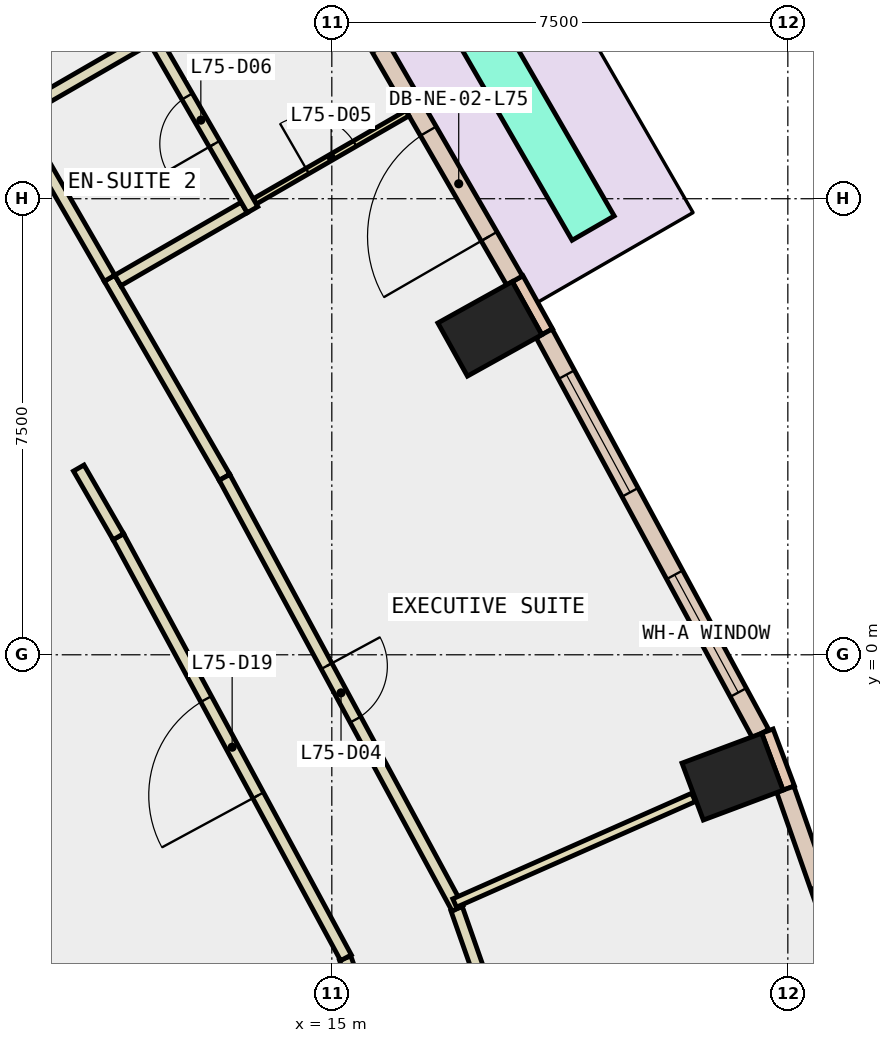
"""IFC4 building model, lengths in metres.
Left out: names, types, materials, properties, quantities, classifications, styles, units other than length and angle.
Written with IfcOpenShell. Run it as: python <this file> out.ifc"""

import sys

from ifc_helpers import new_model, si_unit, direction, frame, frame_2d, origin, origin_2d, place, context, subcontext, project, spatial, rectangle, extrude, element, fill, save


model = new_model("IFC4")
c1 = context("Model", 3, precision=1e-05, world=origin(), true_north=direction((0.0, 1.0)))
c2 = subcontext(c1, "Body", "Model", "MODEL_VIEW")
j1 = project(units=[si_unit("LENGTHUNIT", "METRE"), si_unit("PLANEANGLEUNIT", "RADIAN")], contexts=[c1])
p1 = place(None, origin())
s1 = spatial("IfcSite", under=j1, at=p1, CompositionType="ELEMENT")
p2 = place(p1, origin())
s2 = spatial("IfcBuilding", under=s1, at=p2, CompositionType="ELEMENT")
p3 = place(p2, frame((0.0, 0.0, 318.8)))
s3 = spatial("IfcBuildingStorey", under=s2, at=p3, CompositionType="ELEMENT", Elevation=318.8)
for number, where, z_axis, x_axis in (
    (1, (21.59, -2.004, -0.34), (0.0, 0.0, 1.0), (-0.351, 0.936, 0.0)),
    (2, (17.599, 5.36, -0.34), (0.0, 0.0, 1.0), (-0.486, 0.874, 0.0)),
):
    element("IfcColumn", number, at=place(p3, frame(where, z_axis=z_axis, x_axis=x_axis)), inside=s3, PredefinedType="COLUMN", context=c2, shape_type="SweptSolid", body=[
        extrude(rectangle(XDim=1.0, YDim=1.4, at=origin_2d()), origin(), (0.0, 0.0, 1.0), 3.6),
    ])
p4 = place(p3, frame((6.279, -3.625, -0.34), z_axis=(0.0, 0.0, 1.0), x_axis=(0.866017533419, -0.500013631625, 0.0)))
e3 = element("IfcWall", 3, at=p4, inside=s3, PredefinedType="SHEAR", context=c2, shape_type="SweptSolid", body=[
    extrude(rectangle(XDim=9.0, YDim=0.8, at=frame_2d((4.5, 0.0))), origin(), (0.0, 0.0, 1.0), 3.6),
])
p5 = place(p3, frame((22.515, -2.191, 0.0), z_axis=(0.0, 0.0, 1.0), x_axis=(-0.350962844851, 0.936389385637, 0.0)))
e4 = element("IfcWall", 4, at=p5, inside=s3, PredefinedType="STANDARD", context=c2, shape_type="SweptSolid", body=[
    extrude(rectangle(XDim=1.0, YDim=0.2, at=frame_2d((0.5, 0.0))), origin(), (0.0, 0.0, 1.0), 3.26),
])
p6 = place(p3, frame((18.542, 5.311, 0.0), z_axis=(0.0, 0.0, 1.0), x_axis=(-0.486036693078, 0.873938403425, 0.0)))
e5 = element("IfcWall", 5, at=p6, inside=s3, PredefinedType="STANDARD", context=c2, shape_type="SweptSolid", body=[
    extrude(rectangle(XDim=1.0, YDim=0.2, at=frame_2d((0.5, 0.0))), origin(), (0.0, 0.0, 1.0), 3.26),
])
p7 = place(p3, frame((24.029, -6.692, 0.0), z_axis=(0.0, 0.0, 1.0), x_axis=(-0.330923030855, 0.943657749213, 0.0)))
e6 = element("IfcWall", 6, at=p7, inside=s3, PredefinedType="STANDARD", context=c2, shape_type="SweptSolid", body=[
    extrude(rectangle(XDim=4.748, YDim=0.3, at=frame_2d((2.374, 0.0))), origin(), (0.0, 0.0, 1.0), 3.26),
])
p8 = place(p7, frame((1.674, 0.0, 0.9)))
e7 = element("IfcOpeningElement", 7, at=p8, cuts=e6, PredefinedType="OPENING", context=c2, shape_type="SweptSolid", body=[
    extrude(rectangle(XDim=1.4, YDim=2.0, at=frame_2d((0.7, 1.0))), frame((0.0, 0.16, 0.0), z_axis=(0.0, -1.0, 0.0), x_axis=(1.0, 0.0, 0.0)), (0.0, 0.0, 1.0), 0.32),
])
p9 = place(p3, frame((22.052, -1.298, 0.0), z_axis=(0.0, 0.0, 1.0), x_axis=(-0.475690331633, 0.879612817319, 0.0)))
e8 = element("IfcWall", 8, at=p9, inside=s3, PredefinedType="STANDARD", context=c2, shape_type="SweptSolid", body=[
    extrude(rectangle(XDim=7.484, YDim=0.3, at=frame_2d((3.742, 0.0))), origin(), (0.0, 0.0, 1.0), 3.26),
])
p10 = place(p9, frame((0.771, 0.0, 0.9)))
e9 = element("IfcOpeningElement", 9, at=p10, cuts=e8, PredefinedType="OPENING", context=c2, shape_type="SweptSolid", body=[
    extrude(rectangle(XDim=2.2, YDim=2.0, at=frame_2d((1.1, 1.0))), frame((0.0, 0.16, 0.0), z_axis=(0.0, -1.0, 0.0), x_axis=(1.0, 0.0, 0.0)), (0.0, 0.0, 1.0), 0.32),
])
p11 = place(p9, frame((4.513, 0.0, 0.9)))
e10 = element("IfcOpeningElement", 10, at=p11, cuts=e8, PredefinedType="OPENING", context=c2, shape_type="SweptSolid", body=[
    extrude(rectangle(XDim=2.2, YDim=2.0, at=frame_2d((1.1, 1.0))), frame((0.0, 0.16, 0.0), z_axis=(0.0, -1.0, 0.0), x_axis=(1.0, 0.0, 0.0)), (0.0, 0.0, 1.0), 0.32),
])
p12 = place(p3, frame((18.005, 6.156, 0.0), z_axis=(0.0, 0.0, 1.0), x_axis=(-0.499958474759, 0.866049377066, 0.0)))
e11 = element("IfcWall", 11, at=p12, inside=s3, PredefinedType="STANDARD", context=c2, shape_type="SweptSolid", body=[
    extrude(rectangle(XDim=7.342, YDim=0.3, at=frame_2d((3.671, 0.0))), origin(), (0.0, 0.0, 1.0), 3.26),
])
p13 = place(p12, frame((0.836, 0.0, 0.0)))
e12 = element("IfcOpeningElement", 12, at=p13, cuts=e11, PredefinedType="OPENING", context=c2, shape_type="SweptSolid", body=[
    extrude(rectangle(XDim=2.0, YDim=2.4, at=frame_2d((1.0, 1.2))), frame((0.0, 0.16, 0.0), z_axis=(0.0, -1.0, 0.0), x_axis=(1.0, 0.0, 0.0)), (0.0, 0.0, 1.0), 0.32),
])
p14 = place(p12, frame((4.407, 0.0, 0.9)))
e13 = element("IfcOpeningElement", 13, at=p14, cuts=e11, PredefinedType="OPENING", context=c2, shape_type="SweptSolid", body=[
    extrude(rectangle(XDim=2.2, YDim=2.0, at=frame_2d((1.1, 1.0))), frame((0.0, 0.16, 0.0), z_axis=(0.0, -1.0, 0.0), x_axis=(1.0, 0.0, 0.0)), (0.0, 0.0, 1.0), 0.32),
])
p15 = place(p3, frame((19.298, 7.017, 0.0), z_axis=(0.0, 0.0, 1.0), x_axis=(-0.50009711543, 0.865969326904, 0.0)))
e14 = element("IfcWall", 14, at=p15, inside=s3, PredefinedType="STANDARD", context=c2, shape_type="SweptSolid", body=[
    extrude(rectangle(XDim=7.145, YDim=0.8, at=frame_2d((3.572, 0.0))), origin(), (0.0, 0.0, 1.0), 0.8),
])
p16 = place(p3, frame((16.194, -7.768, 0.0), z_axis=(0.0, 0.0, 1.0), x_axis=(-0.330981563235, 0.943637220969, 0.0)))
e15 = element("IfcWall", 15, at=p16, inside=s3, PredefinedType="PARTITIONING", context=c2, shape_type="SweptSolid", body=[
    extrude(rectangle(XDim=2.946, YDim=0.2, at=frame_2d((1.473, 0.0))), origin(), (0.0, 0.0, 1.0), 3.26),
])
p17 = place(p3, frame((15.233, -4.982, 0.0), z_axis=(0.0, 0.0, 1.0), x_axis=(-0.475643534049, 0.879638123615, 0.0)))
e16 = element("IfcWall", 16, at=p17, inside=s3, PredefinedType="PARTITIONING", context=c2, shape_type="SweptSolid", body=[
    extrude(rectangle(XDim=7.871, YDim=0.2, at=frame_2d((3.936, 0.0))), origin(), (0.0, 0.0, 1.0), 3.26),
])
p18 = place(p17, frame((3.036, 0.0, 0.0)))
e17 = element("IfcOpeningElement", 17, at=p18, cuts=e16, PredefinedType="OPENING", context=c2, shape_type="SweptSolid", body=[
    extrude(rectangle(XDim=1.8, YDim=2.1, at=frame_2d((0.9, 1.05))), frame((0.0, 0.11, 0.0), z_axis=(0.0, -1.0, 0.0), x_axis=(1.0, 0.0, 0.0)), (0.0, 0.0, 1.0), 0.22),
])
p19 = place(p3, frame((11.489, 1.942, 0.0), z_axis=(0.0, 0.0, 1.0), x_axis=(-0.499544076393, 0.866288471435, 0.0)))
e18 = element("IfcWall", 18, at=p19, inside=s3, PredefinedType="PARTITIONING", context=c2, shape_type="SweptSolid", body=[
    extrude(rectangle(XDim=1.303, YDim=0.2, at=frame_2d((0.652, 0.0))), origin(), (0.0, 0.0, 1.0), 3.26),
])
p20 = place(p3, frame((17.053, -4.177, 0.0), z_axis=(0.0, 0.0, 1.0), x_axis=(0.33112192567, -0.943587977001, 0.0)))
e19 = element("IfcWall", 19, at=p20, inside=s3, PredefinedType="PARTITIONING", context=c2, shape_type="SweptSolid", body=[
    extrude(rectangle(XDim=3.678, YDim=0.2, at=frame_2d((1.839, 0.0))), origin(), (0.0, 0.0, 1.0), 3.26),
])
p21 = place(p3, frame((11.344, 6.193, 0.0), z_axis=(0.0, 0.0, 1.0), x_axis=(0.50004096614, -0.86600175068, 0.0)))
e20 = element("IfcWall", 20, at=p21, inside=s3, PredefinedType="PARTITIONING", context=c2, shape_type="SweptSolid", body=[
    extrude(rectangle(XDim=3.782, YDim=0.2, at=frame_2d((1.891, 0.0))), origin(), (0.0, 0.0, 1.0), 3.26),
])
p22 = place(p3, frame((13.235, 2.918, 0.0), z_axis=(0.0, 0.0, 1.0), x_axis=(0.475681790703, -0.879617436158, 0.0)))
e21 = element("IfcWall", 21, at=p22, inside=s3, PredefinedType="PARTITIONING", context=c2, shape_type="SweptSolid", body=[
    extrude(rectangle(XDim=8.058, YDim=0.2, at=frame_2d((4.029, 0.0))), origin(), (0.0, 0.0, 1.0), 3.26),
])
p23 = place(p22, frame((3.529, 0.0, 0.0)))
e22 = element("IfcOpeningElement", 22, at=p23, cuts=e21, PredefinedType="OPENING", context=c2, shape_type="SweptSolid", body=[
    extrude(rectangle(XDim=1.0, YDim=2.1, at=frame_2d((0.5, 1.05))), frame((0.0, 0.11, 0.0), z_axis=(0.0, -1.0, 0.0), x_axis=(1.0, 0.0, 0.0)), (0.0, 0.0, 1.0), 0.22),
])
p24 = place(p3, frame((9.744, 8.964, 0.0), z_axis=(0.0, 0.0, 1.0), x_axis=(0.500290307618, -0.865857729713, 0.0)))
e23 = element("IfcWall", 23, at=p24, inside=s3, PredefinedType="PARTITIONING", context=c2, shape_type="SweptSolid", body=[
    extrude(rectangle(XDim=3.2, YDim=0.2, at=frame_2d((1.6, 0.0))), origin(), (0.0, 0.0, 1.0), 3.26),
])
p25 = place(p3, frame((17.02, -4.082, 0.0), z_axis=(0.0, 0.0, 1.0), x_axis=(0.914599611743, 0.404360668462, 0.0)))
e24 = element("IfcWall", 24, at=p25, inside=s3, PredefinedType="PARTITIONING", context=c2, shape_type="SweptSolid", body=[
    extrude(rectangle(XDim=4.296, YDim=0.15, at=frame_2d((2.148, 0.0))), origin(), (0.0, 0.0, 1.0), 3.26),
])
p26 = place(p3, frame((13.733, 7.456, 0.0), z_axis=(0.0, 0.0, 1.0), x_axis=(0.865990674793, 0.500060147554, 0.0)))
e25 = element("IfcWall", 25, at=p26, inside=s3, PredefinedType="PARTITIONING", context=c2, shape_type="SweptSolid", body=[
    extrude(rectangle(XDim=2.9, YDim=0.1, at=frame_2d((1.45, 0.0))), origin(), (0.0, 0.0, 1.0), 3.26),
])
p27 = place(p26, frame((1.0, 0.0, 0.0)))
e26 = element("IfcOpeningElement", 26, at=p27, cuts=e25, PredefinedType="OPENING", context=c2, shape_type="SweptSolid", body=[
    extrude(rectangle(XDim=0.9, YDim=2.1, at=frame_2d((0.45, 1.05))), frame((0.0, 0.06, 0.0), z_axis=(0.0, -1.0, 0.0), x_axis=(1.0, 0.0, 0.0)), (0.0, 0.0, 1.0), 0.12),
])
p28 = place(p3, frame((11.481, 6.156, 0.0), z_axis=(0.0, 0.0, 1.0), x_axis=(0.865999212041, 0.500045362686, 0.0)))
e27 = element("IfcWall", 27, at=p28, inside=s3, PredefinedType="PARTITIONING", context=c2, shape_type="SweptSolid", body=[
    extrude(rectangle(XDim=2.4, YDim=0.2, at=frame_2d((1.2, 0.0))), origin(), (0.0, 0.0, 1.0), 3.26),
])
p29 = place(p3, frame((13.696, 7.32, 0.0), z_axis=(0.0, 0.0, 1.0), x_axis=(-0.500070584245, 0.865984648116, 0.0)))
e28 = element("IfcWall", 28, at=p29, inside=s3, PredefinedType="PARTITIONING", context=c2, shape_type="SweptSolid", body=[
    extrude(rectangle(XDim=3.399, YDim=0.2, at=frame_2d((1.7, 0.0))), origin(), (0.0, 0.0, 1.0), 3.26),
])
p30 = place(p29, frame((1.25, 0.0, 0.0)))
e29 = element("IfcOpeningElement", 29, at=p30, cuts=e28, PredefinedType="OPENING", context=c2, shape_type="SweptSolid", body=[
    extrude(rectangle(XDim=0.9, YDim=2.1, at=frame_2d((0.45, 1.05))), frame((0.0, 0.11, 0.0), z_axis=(0.0, -1.0, 0.0), x_axis=(1.0, 0.0, 0.0)), (0.0, 0.0, 1.0), 0.22),
])
p31 = place(p3, frame((11.959, 10.127, 0.0), z_axis=(0.0, 0.0, 1.0), x_axis=(-0.866022959057, -0.500004234368, 0.0)))
e30 = element("IfcWall", 30, at=p31, inside=s3, PredefinedType="PARTITIONING", context=c2, shape_type="SweptSolid", body=[
    extrude(rectangle(XDim=2.5, YDim=0.2, at=frame_2d((1.25, 0.0))), origin(), (0.0, 0.0, 1.0), 3.26),
])
p32 = place(p10, origin())
e31 = element("IfcWindow", 31, at=p32, inside=s3, PartitioningType="SINGLE_PANEL", PredefinedType="WINDOW", context=c2, shape_type="SweptSolid", body=[
    extrude(rectangle(XDim=2.2, YDim=2.0, at=frame_2d((1.1, 1.0))), frame((0.0, 0.03, 0.0), z_axis=(0.0, -1.0, 0.0), x_axis=(1.0, 0.0, 0.0)), (0.0, 0.0, 1.0), 0.06),
])
fill(e9, e31)
p33 = place(p11, origin())
e32 = element("IfcWindow", 32, at=p33, inside=s3, PartitioningType="SINGLE_PANEL", PredefinedType="WINDOW", context=c2, shape_type="SweptSolid", body=[
    extrude(rectangle(XDim=2.2, YDim=2.0, at=frame_2d((1.1, 1.0))), frame((0.0, 0.03, 0.0), z_axis=(0.0, -1.0, 0.0), x_axis=(1.0, 0.0, 0.0)), (0.0, 0.0, 1.0), 0.06),
])
fill(e10, e32)
p34 = place(p13, origin())
e33 = element("IfcDoor", 33, at=p34, inside=s3, OperationType="SLIDING_TO_LEFT", PredefinedType="DOOR", context=c2, shape_type="SweptSolid", body=[
    extrude(rectangle(XDim=2.0, YDim=2.4, at=frame_2d((1.0, 1.2))), frame((0.0, 0.025, 0.0), z_axis=(0.0, -1.0, 0.0), x_axis=(1.0, 0.0, 0.0)), (0.0, 0.0, 1.0), 0.05),
])
fill(e12, e33)
p35 = place(p23, origin())
e34 = element("IfcDoor", 34, at=p35, inside=s3, OperationType="SINGLE_SWING_LEFT", PredefinedType="DOOR", context=c2, shape_type="SweptSolid", body=[
    extrude(rectangle(XDim=1.0, YDim=2.1, at=frame_2d((0.5, 1.05))), frame((0.0, 0.025, 0.0), z_axis=(0.0, -1.0, 0.0), x_axis=(1.0, 0.0, 0.0)), (0.0, 0.0, 1.0), 0.05),
])
fill(e22, e34)
p36 = place(p27, origin())
e35 = element("IfcDoor", 35, at=p36, inside=s3, OperationType="SINGLE_SWING_LEFT", PredefinedType="DOOR", context=c2, shape_type="SweptSolid", body=[
    extrude(rectangle(XDim=0.9, YDim=2.1, at=frame_2d((0.45, 1.05))), frame((0.0, 0.025, 0.0), z_axis=(0.0, -1.0, 0.0), x_axis=(1.0, 0.0, 0.0)), (0.0, 0.0, 1.0), 0.05),
])
fill(e26, e35)
p37 = place(p30, origin())
e36 = element("IfcDoor", 36, at=p37, inside=s3, OperationType="SINGLE_SWING_LEFT", PredefinedType="DOOR", context=c2, shape_type="SweptSolid", body=[
    extrude(rectangle(XDim=0.9, YDim=2.1, at=frame_2d((0.45, 1.05))), frame((0.0, 0.025, 0.0), z_axis=(0.0, -1.0, 0.0), x_axis=(1.0, 0.0, 0.0)), (0.0, 0.0, 1.0), 0.05),
])
fill(e29, e36)
p38 = place(p18, origin())
e37 = element("IfcDoor", 37, at=p38, inside=s3, OperationType="DOUBLE_DOOR_SINGLE_SWING", PredefinedType="DOOR", context=c2, shape_type="SweptSolid", body=[
    extrude(rectangle(XDim=1.8, YDim=2.1, at=frame_2d((0.9, 1.05))), frame((0.0, 0.025, 0.0), z_axis=(0.0, -1.0, 0.0), x_axis=(1.0, 0.0, 0.0)), (0.0, 0.0, 1.0), 0.05),
])
fill(e17, e37)
save(model, sys.argv[1])
